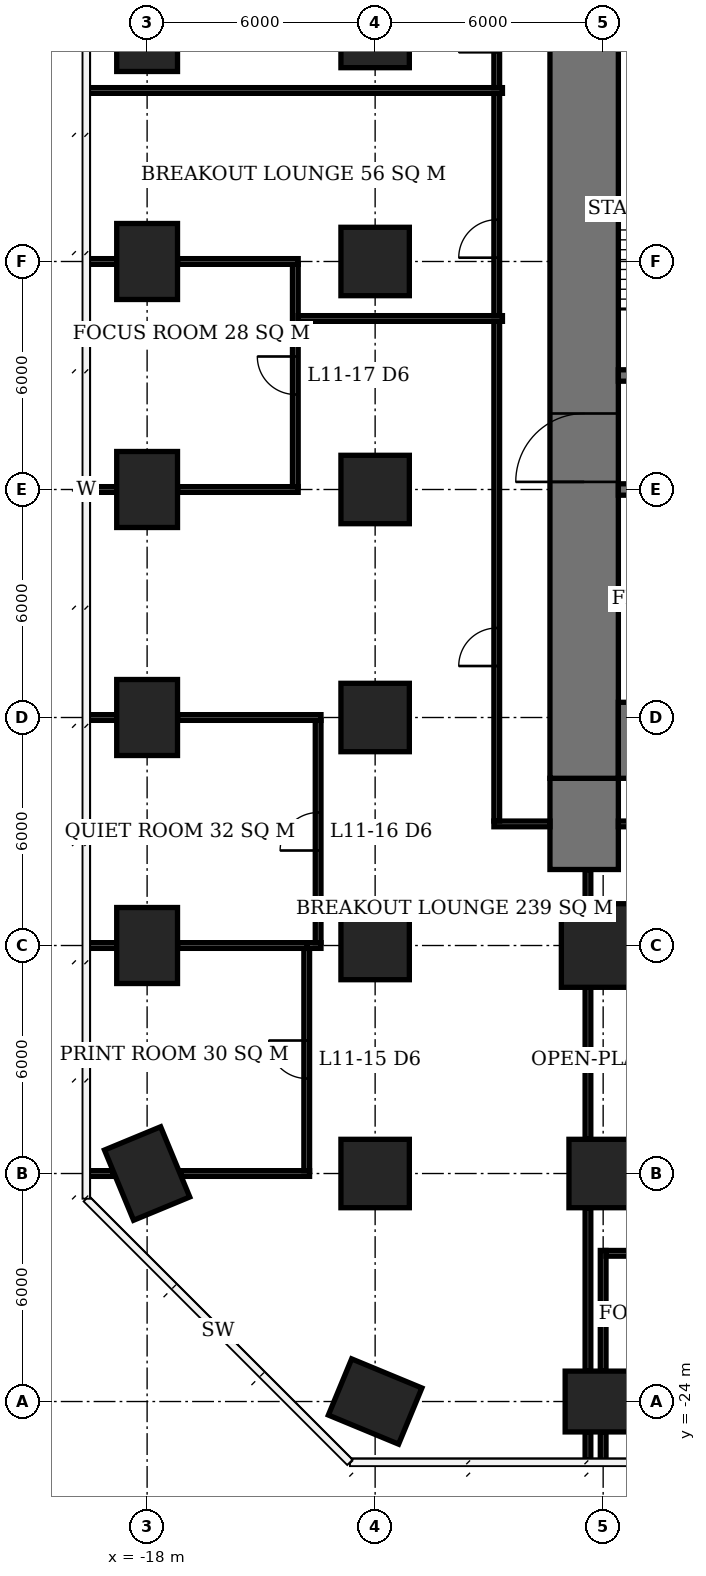
"""IFC4 building model, lengths in metres.
Left out: names, types, materials, properties, quantities, classifications, styles, units other than length and angle.
Written with IfcOpenShell. Run it as: python <this file> out.ifc"""

import sys

from ifc_helpers import new_model, si_unit, direction, frame, frame_2d, origin, origin_2d, place, context, subcontext, project, spatial, rectangle, extrude, element, fill, save


model = new_model("IFC4")
c1 = context("Model", 3, precision=1e-05, world=origin(), true_north=direction((0.0, 1.0)))
c2 = subcontext(c1, "Body", "Model", "MODEL_VIEW")
j1 = project(units=[si_unit("LENGTHUNIT", "METRE"), si_unit("PLANEANGLEUNIT", "RADIAN")], contexts=[c1])
p1 = place(None, origin())
s1 = spatial("IfcSite", under=j1, at=p1, CompositionType="ELEMENT")
p2 = place(p1, origin())
s2 = spatial("IfcBuilding", under=s1, at=p2, CompositionType="ELEMENT")
p3 = place(p2, frame((0.0, 0.0, 49.4)))
s3 = spatial("IfcBuildingStorey", under=s2, at=p3, CompositionType="ELEMENT", Elevation=49.4)
for number, where, z_axis, x_axis in (
    (1, (-18.0, -18.0, 0.0), (0.0, 0.0, 1.0), (-0.383, 0.924, 0.0)),
    (2, (-18.0, -12.0, 0.0), (0.0, 0.0, 1.0), (0.0, 1.0, 0.0)),
    (3, (-18.0, -6.0, 0.0), (0.0, 0.0, 1.0), (0.0, 1.0, 0.0)),
    (4, (-18.0, 0.0, 0.0), (0.0, 0.0, 1.0), (0.0, 1.0, 0.0)),
    (5, (-18.0, 6.0, 0.0), (0.0, 0.0, 1.0), (0.0, 1.0, 0.0)),
    (6, (-18.0, 12.0, 0.0), (0.0, 0.0, 1.0), (0.0, 1.0, 0.0)),
    (7, (-12.0, -24.0, 0.0), (0.0, 0.0, 1.0), (-0.924, 0.383, 0.0)),
):
    element("IfcColumn", number, at=place(p3, frame(where, z_axis=z_axis, x_axis=x_axis)), inside=s3, PredefinedType="COLUMN", context=c2, shape_type="SweptSolid", body=[
        extrude(rectangle(XDim=2.0, YDim=1.6, at=origin_2d()), origin(), (0.0, 0.0, 1.0), 3.9),
    ])
for number, where, z_axis, x_axis in (
    (8, (-12.0, -18.0, 0.0), (0.0, 0.0, 1.0), (1.0, 0.0, 0.0)),
    (9, (-12.0, -12.0, 0.0), (0.0, 0.0, 1.0), (1.0, 0.0, 0.0)),
    (10, (-12.0, -6.0, 0.0), (0.0, 0.0, 1.0), (1.0, 0.0, 0.0)),
    (11, (-12.0, 0.0, 0.0), (0.0, 0.0, 1.0), (1.0, 0.0, 0.0)),
    (12, (-12.0, 6.0, 0.0), (0.0, 0.0, 1.0), (1.0, 0.0, 0.0)),
    (13, (-12.0, 12.0, 0.0), (0.0, 0.0, 1.0), (1.0, 0.0, 0.0)),
):
    element("IfcColumn", number, at=place(p3, frame(where, z_axis=z_axis, x_axis=x_axis)), inside=s3, PredefinedType="COLUMN", context=c2, shape_type="SweptSolid", body=[
        extrude(rectangle(XDim=1.8, YDim=1.8, at=origin_2d()), origin(), (0.0, 0.0, 1.0), 3.9),
    ])
p4 = place(p3, frame((-6.0, -24.0, 0.0), z_axis=(0.0, 0.0, 1.0), x_axis=(1.0, 0.0, 0.0)))
e14 = element("IfcColumn", 14, at=p4, inside=s3, PredefinedType="COLUMN", context=c2, shape_type="SweptSolid", body=[
    extrude(rectangle(XDim=2.0, YDim=1.6, at=origin_2d()), origin(), (0.0, 0.0, 1.0), 3.9),
])
p5 = place(p3, frame((-6.0, -18.0, 0.0), z_axis=(0.0, 0.0, 1.0), x_axis=(1.0, 0.0, 0.0)))
e15 = element("IfcColumn", 15, at=p5, inside=s3, PredefinedType="COLUMN", context=c2, shape_type="SweptSolid", body=[
    extrude(rectangle(XDim=1.8, YDim=1.8, at=origin_2d()), origin(), (0.0, 0.0, 1.0), 3.9),
])
p6 = place(p3, frame((-6.0, -12.0, 0.0), z_axis=(0.0, 0.0, 1.0), x_axis=(1.0, 0.0, 0.0)))
e16 = element("IfcColumn", 16, at=p6, inside=s3, PredefinedType="COLUMN", context=c2, shape_type="SweptSolid", body=[
    extrude(rectangle(XDim=2.2, YDim=2.2, at=origin_2d()), origin(), (0.0, 0.0, 1.0), 3.9),
])
p7 = place(p3, frame((-5.6, -6.6, 0.0), z_axis=(0.0, 0.0, 1.0), x_axis=(1.0, 0.0, 0.0)))
e17 = element("IfcWall", 17, at=p7, inside=s3, PredefinedType="SHEAR", context=c2, shape_type="SweptSolid", body=[
    extrude(rectangle(XDim=23.2, YDim=2.0, at=frame_2d((11.6, 0.0))), origin(), (0.0, 0.0, 1.0), 3.9),
])
p8 = place(p3, frame((-6.5, -7.6, 0.0), z_axis=(0.0, 0.0, 1.0), x_axis=(0.0, 1.0, 0.0)))
e18 = element("IfcWall", 18, at=p8, inside=s3, PredefinedType="SHEAR", context=c2, shape_type="SweptSolid", body=[
    extrude(rectangle(XDim=21.2, YDim=1.8, at=frame_2d((10.6, 0.0))), origin(), (0.0, 0.0, 1.0), 3.9),
])
p9 = place(p8, frame((7.8, 0.0, 0.0)))
e19 = element("IfcOpeningElement", 19, at=p9, cuts=e18, PredefinedType="OPENING", context=c2, shape_type="SweptSolid", body=[
    extrude(rectangle(XDim=1.8, YDim=2.4, at=frame_2d((0.9, 1.2))), frame((0.0, 0.91, 0.0), z_axis=(0.0, -1.0, 0.0), x_axis=(1.0, 0.0, 0.0)), (0.0, 0.0, 1.0), 1.82),
])
p10 = place(p3, frame((-6.5, -10.0, 0.0), z_axis=(0.0, 0.0, 1.0), x_axis=(0.0, 1.0, 0.0)))
e20 = element("IfcWall", 20, at=p10, inside=s3, PredefinedType="SHEAR", context=c2, shape_type="SweptSolid", body=[
    extrude(rectangle(XDim=2.4, YDim=1.8, at=frame_2d((1.2, 0.0))), origin(), (0.0, 0.0, 1.0), 3.9),
])
p11 = place(p3, frame((-5.6, 0.0, 0.0), z_axis=(0.0, 0.0, 1.0), x_axis=(1.0, 0.0, 0.0)))
e21 = element("IfcWall", 21, at=p11, inside=s3, PredefinedType="SHEAR", context=c2, shape_type="SweptSolid", body=[
    extrude(rectangle(XDim=17.75, YDim=0.3, at=frame_2d((8.875, 0.0))), origin(), (0.0, 0.0, 1.0), 3.9),
])
p12 = place(p11, frame((0.6, 0.0, 0.0)))
e22 = element("IfcOpeningElement", 22, at=p12, cuts=e21, PredefinedType="OPENING", context=c2, shape_type="SweptSolid", body=[
    extrude(rectangle(XDim=0.9, YDim=2.1, at=frame_2d((0.45, 1.05))), frame((0.0, 0.16, 0.0), z_axis=(0.0, -1.0, 0.0), x_axis=(1.0, 0.0, 0.0)), (0.0, 0.0, 1.0), 0.32),
])
p13 = place(p3, frame((-5.6, 3.0, 0.0), z_axis=(0.0, 0.0, 1.0), x_axis=(1.0, 0.0, 0.0)))
e23 = element("IfcWall", 23, at=p13, inside=s3, PredefinedType="SHEAR", context=c2, shape_type="SweptSolid", body=[
    extrude(rectangle(XDim=5.45, YDim=0.3, at=frame_2d((2.725, 0.0))), origin(), (0.0, 0.0, 1.0), 3.9),
])
p14 = place(p13, frame((0.4, 0.0, 0.0)))
e24 = element("IfcOpeningElement", 24, at=p14, cuts=e23, PredefinedType="OPENING", context=c2, shape_type="SweptSolid", body=[
    extrude(rectangle(XDim=1.2, YDim=2.1, at=frame_2d((0.6, 1.05))), frame((0.0, 0.16, 0.0), z_axis=(0.0, -1.0, 0.0), x_axis=(1.0, 0.0, 0.0)), (0.0, 0.0, 1.0), 0.32),
])
p15 = place(p13, frame((3.95, 0.0, 0.0)))
e25 = element("IfcOpeningElement", 25, at=p15, cuts=e23, PredefinedType="OPENING", context=c2, shape_type="SweptSolid", body=[
    extrude(rectangle(XDim=0.9, YDim=2.1, at=frame_2d((0.45, 1.05))), frame((0.0, 0.16, 0.0), z_axis=(0.0, -1.0, 0.0), x_axis=(1.0, 0.0, 0.0)), (0.0, 0.0, 1.0), 0.32),
])
p16 = place(p3, frame((-5.925, -20.1, 0.0), z_axis=(0.0, 0.0, 1.0), x_axis=(1.0, 0.0, 0.0)))
e26 = element("IfcWall", 26, at=p16, inside=s3, PredefinedType="PARTITIONING", context=c2, shape_type="SweptSolid", body=[
    extrude(rectangle(XDim=5.85, YDim=0.15, at=frame_2d((2.925, 0.0))), origin(), (0.0, 0.0, 1.0), 3.65),
])
p17 = place(p16, frame((2.425, 0.0, 0.0)))
e27 = element("IfcOpeningElement", 27, at=p17, cuts=e26, PredefinedType="OPENING", context=c2, shape_type="SweptSolid", body=[
    extrude(rectangle(XDim=1.0, YDim=2.1, at=frame_2d((0.5, 1.05))), frame((0.0, 0.085, 0.0), z_axis=(0.0, -1.0, 0.0), x_axis=(1.0, 0.0, 0.0)), (0.0, 0.0, 1.0), 0.17),
])
p18 = place(p3, frame((-19.6, -18.0, 0.0), z_axis=(0.0, 0.0, 1.0), x_axis=(1.0, 0.0, 0.0)))
e28 = element("IfcWall", 28, at=p18, inside=s3, PredefinedType="PARTITIONING", context=c2, shape_type="SweptSolid", body=[
    extrude(rectangle(XDim=0.703, YDim=0.15, at=frame_2d((0.352, 0.0))), origin(), (0.0, 0.0, 1.0), 3.65),
])
p19 = place(p3, frame((-17.103, -18.0, 0.0), z_axis=(0.0, 0.0, 1.0), x_axis=(1.0, 0.0, 0.0)))
e29 = element("IfcWall", 29, at=p19, inside=s3, PredefinedType="PARTITIONING", context=c2, shape_type="SweptSolid", body=[
    extrude(rectangle(XDim=3.378, YDim=0.15, at=frame_2d((1.689, 0.0))), origin(), (0.0, 0.0, 1.0), 3.65),
])
p20 = place(p3, frame((-19.6, -12.0, 0.0), z_axis=(0.0, 0.0, 1.0), x_axis=(1.0, 0.0, 0.0)))
e30 = element("IfcWall", 30, at=p20, inside=s3, PredefinedType="PARTITIONING", context=c2, shape_type="SweptSolid", body=[
    extrude(rectangle(XDim=0.8, YDim=0.15, at=frame_2d((0.4, 0.0))), origin(), (0.0, 0.0, 1.0), 3.65),
])
p21 = place(p3, frame((-17.2, -12.0, 0.0), z_axis=(0.0, 0.0, 1.0), x_axis=(1.0, 0.0, 0.0)))
e31 = element("IfcWall", 31, at=p21, inside=s3, PredefinedType="PARTITIONING", context=c2, shape_type="SweptSolid", body=[
    extrude(rectangle(XDim=3.475, YDim=0.15, at=frame_2d((1.737, 0.0))), origin(), (0.0, 0.0, 1.0), 3.65),
])
p22 = place(p3, frame((-13.8, -12.0, 0.0), z_axis=(0.0, 0.0, 1.0), x_axis=(1.0, 0.0, 0.0)))
e32 = element("IfcWall", 32, at=p22, inside=s3, PredefinedType="PARTITIONING", context=c2, shape_type="SweptSolid", body=[
    extrude(rectangle(XDim=0.375, YDim=0.15, at=frame_2d((0.188, 0.0))), origin(), (0.0, 0.0, 1.0), 3.65),
])
p23 = place(p3, frame((-19.6, -6.0, 0.0), z_axis=(0.0, 0.0, 1.0), x_axis=(1.0, 0.0, 0.0)))
e33 = element("IfcWall", 33, at=p23, inside=s3, PredefinedType="PARTITIONING", context=c2, shape_type="SweptSolid", body=[
    extrude(rectangle(XDim=0.8, YDim=0.15, at=frame_2d((0.4, 0.0))), origin(), (0.0, 0.0, 1.0), 3.65),
])
p24 = place(p3, frame((-17.2, -6.0, 0.0), z_axis=(0.0, 0.0, 1.0), x_axis=(1.0, 0.0, 0.0)))
e34 = element("IfcWall", 34, at=p24, inside=s3, PredefinedType="PARTITIONING", context=c2, shape_type="SweptSolid", body=[
    extrude(rectangle(XDim=3.775, YDim=0.15, at=frame_2d((1.887, 0.0))), origin(), (0.0, 0.0, 1.0), 3.65),
])
p25 = place(p3, frame((-19.55, 0.0, 0.0), z_axis=(0.0, 0.0, 1.0), x_axis=(1.0, 0.0, 0.0)))
e35 = element("IfcWall", 35, at=p25, inside=s3, PredefinedType="PARTITIONING", context=c2, shape_type="SweptSolid", body=[
    extrude(rectangle(XDim=0.75, YDim=0.15, at=frame_2d((0.375, 0.0))), origin(), (0.0, 0.0, 1.0), 3.65),
])
p26 = place(p3, frame((-17.2, 0.0, 0.0), z_axis=(0.0, 0.0, 1.0), x_axis=(1.0, 0.0, 0.0)))
e36 = element("IfcWall", 36, at=p26, inside=s3, PredefinedType="PARTITIONING", context=c2, shape_type="SweptSolid", body=[
    extrude(rectangle(XDim=3.175, YDim=0.15, at=frame_2d((1.587, 0.0))), origin(), (0.0, 0.0, 1.0), 3.65),
])
p27 = place(p3, frame((-19.6, 6.0, 0.0), z_axis=(0.0, 0.0, 1.0), x_axis=(1.0, 0.0, 0.0)))
e37 = element("IfcWall", 37, at=p27, inside=s3, PredefinedType="PARTITIONING", context=c2, shape_type="SweptSolid", body=[
    extrude(rectangle(XDim=0.8, YDim=0.15, at=frame_2d((0.4, 0.0))), origin(), (0.0, 0.0, 1.0), 3.65),
])
p28 = place(p3, frame((-17.2, 6.0, 0.0), z_axis=(0.0, 0.0, 1.0), x_axis=(1.0, 0.0, 0.0)))
e38 = element("IfcWall", 38, at=p28, inside=s3, PredefinedType="PARTITIONING", context=c2, shape_type="SweptSolid", body=[
    extrude(rectangle(XDim=3.175, YDim=0.15, at=frame_2d((1.587, 0.0))), origin(), (0.0, 0.0, 1.0), 3.65),
])
p29 = place(p3, frame((-14.1, 0.075, 0.0), z_axis=(0.0, 0.0, 1.0), x_axis=(0.0, 1.0, 0.0)))
e39 = element("IfcWall", 39, at=p29, inside=s3, PredefinedType="PARTITIONING", context=c2, shape_type="SweptSolid", body=[
    extrude(rectangle(XDim=5.85, YDim=0.15, at=frame_2d((2.925, 0.0))), origin(), (0.0, 0.0, 1.0), 3.65),
])
p30 = place(p29, frame((2.425, 0.0, 0.0)))
e40 = element("IfcOpeningElement", 40, at=p30, cuts=e39, PredefinedType="OPENING", context=c2, shape_type="SweptSolid", body=[
    extrude(rectangle(XDim=1.0, YDim=2.1, at=frame_2d((0.5, 1.05))), frame((0.0, 0.085, 0.0), z_axis=(0.0, -1.0, 0.0), x_axis=(1.0, 0.0, 0.0)), (0.0, 0.0, 1.0), 0.17),
])
p31 = place(p3, frame((-13.8, -17.925, 0.0), z_axis=(0.0, 0.0, 1.0), x_axis=(0.0, 1.0, 0.0)))
e41 = element("IfcWall", 41, at=p31, inside=s3, PredefinedType="PARTITIONING", context=c2, shape_type="SweptSolid", body=[
    extrude(rectangle(XDim=5.85, YDim=0.15, at=frame_2d((2.925, 0.0))), origin(), (0.0, 0.0, 1.0), 3.65),
])
p32 = place(p31, frame((2.425, 0.0, 0.0)))
e42 = element("IfcOpeningElement", 42, at=p32, cuts=e41, PredefinedType="OPENING", context=c2, shape_type="SweptSolid", body=[
    extrude(rectangle(XDim=1.0, YDim=2.1, at=frame_2d((0.5, 1.05))), frame((0.0, 0.085, 0.0), z_axis=(0.0, -1.0, 0.0), x_axis=(1.0, 0.0, 0.0)), (0.0, 0.0, 1.0), 0.17),
])
p33 = place(p3, frame((-13.5, -11.925, 0.0), z_axis=(0.0, 0.0, 1.0), x_axis=(0.0, 1.0, 0.0)))
e43 = element("IfcWall", 43, at=p33, inside=s3, PredefinedType="PARTITIONING", context=c2, shape_type="SweptSolid", body=[
    extrude(rectangle(XDim=5.85, YDim=0.15, at=frame_2d((2.925, 0.0))), origin(), (0.0, 0.0, 1.0), 3.65),
])
p34 = place(p33, frame((2.425, 0.0, 0.0)))
e44 = element("IfcOpeningElement", 44, at=p34, cuts=e43, PredefinedType="OPENING", context=c2, shape_type="SweptSolid", body=[
    extrude(rectangle(XDim=1.0, YDim=2.1, at=frame_2d((0.5, 1.05))), frame((0.0, 0.085, 0.0), z_axis=(0.0, -1.0, 0.0), x_axis=(1.0, 0.0, 0.0)), (0.0, 0.0, 1.0), 0.17),
])
p35 = place(p3, frame((-6.0, -25.6, 0.0), z_axis=(0.0, 0.0, 1.0), x_axis=(0.0, 1.0, 0.0)))
e45 = element("IfcWall", 45, at=p35, inside=s3, PredefinedType="PARTITIONING", context=c2, shape_type="SweptSolid", body=[
    extrude(rectangle(XDim=0.8, YDim=0.15, at=frame_2d((0.4, 0.0))), origin(), (0.0, 0.0, 1.0), 3.65),
])
p36 = place(p3, frame((-6.0, -23.2, 0.0), z_axis=(0.0, 0.0, 1.0), x_axis=(0.0, 1.0, 0.0)))
e46 = element("IfcWall", 46, at=p36, inside=s3, PredefinedType="PARTITIONING", context=c2, shape_type="SweptSolid", body=[
    extrude(rectangle(XDim=3.175, YDim=0.15, at=frame_2d((1.587, 0.0))), origin(), (0.0, 0.0, 1.0), 3.65),
])
p37 = place(p3, frame((-19.6, 10.5, 0.0), z_axis=(0.0, 0.0, 1.0), x_axis=(1.0, 0.0, 0.0)))
e47 = element("IfcWall", 47, at=p37, inside=s3, PredefinedType="PARTITIONING", context=c2, shape_type="SweptSolid", body=[
    extrude(rectangle(XDim=10.95, YDim=0.15, at=frame_2d((5.475, 0.0))), origin(), (0.0, 0.0, 1.0), 3.65),
])
p38 = place(p3, frame((-14.025, 4.5, 0.0), z_axis=(0.0, 0.0, 1.0), x_axis=(1.0, 0.0, 0.0)))
e48 = element("IfcWall", 48, at=p38, inside=s3, PredefinedType="PARTITIONING", context=c2, shape_type="SweptSolid", body=[
    extrude(rectangle(XDim=5.375, YDim=0.15, at=frame_2d((2.688, 0.0))), origin(), (0.0, 0.0, 1.0), 3.65),
])
p39 = place(p3, frame((-8.8, -8.725, 0.0), z_axis=(0.0, 0.0, 1.0), x_axis=(0.0, 1.0, 0.0)))
e49 = element("IfcWall", 49, at=p39, inside=s3, PredefinedType="PARTITIONING", context=c2, shape_type="SweptSolid", body=[
    extrude(rectangle(XDim=13.15, YDim=0.15, at=frame_2d((6.575, 0.0))), origin(), (0.0, 0.0, 1.0), 3.65),
])
p40 = place(p39, frame((4.08, 0.0, 0.0)))
e50 = element("IfcOpeningElement", 50, at=p40, cuts=e49, PredefinedType="OPENING", context=c2, shape_type="SweptSolid", body=[
    extrude(rectangle(XDim=1.0, YDim=2.1, at=frame_2d((0.5, 1.05))), frame((0.0, 0.085, 0.0), z_axis=(0.0, -1.0, 0.0), x_axis=(1.0, 0.0, 0.0)), (0.0, 0.0, 1.0), 0.17),
])
p41 = place(p3, frame((-8.875, -8.8, 0.0), z_axis=(0.0, 0.0, 1.0), x_axis=(1.0, 0.0, 0.0)))
e51 = element("IfcWall", 51, at=p41, inside=s3, PredefinedType="PARTITIONING", context=c2, shape_type="SweptSolid", body=[
    extrude(rectangle(XDim=1.475, YDim=0.15, at=frame_2d((0.738, 0.0))), origin(), (0.0, 0.0, 1.0), 3.65),
])
p42 = place(p3, frame((-8.8, 4.575, 0.0), z_axis=(0.0, 0.0, 1.0), x_axis=(0.0, 1.0, 0.0)))
e52 = element("IfcWall", 52, at=p42, inside=s3, PredefinedType="PARTITIONING", context=c2, shape_type="SweptSolid", body=[
    extrude(rectangle(XDim=5.85, YDim=0.15, at=frame_2d((2.925, 0.0))), origin(), (0.0, 0.0, 1.0), 3.65),
])
p43 = place(p42, frame((1.525, 0.0, 0.0)))
e53 = element("IfcOpeningElement", 53, at=p43, cuts=e52, PredefinedType="OPENING", context=c2, shape_type="SweptSolid", body=[
    extrude(rectangle(XDim=1.0, YDim=2.1, at=frame_2d((0.5, 1.05))), frame((0.0, 0.085, 0.0), z_axis=(0.0, -1.0, 0.0), x_axis=(1.0, 0.0, 0.0)), (0.0, 0.0, 1.0), 0.17),
])
p44 = place(p3, frame((-8.8, 10.575, 0.0), z_axis=(0.0, 0.0, 1.0), x_axis=(0.0, 1.0, 0.0)))
e54 = element("IfcWall", 54, at=p44, inside=s3, PredefinedType="PARTITIONING", context=c2, shape_type="SweptSolid", body=[
    extrude(rectangle(XDim=4.15, YDim=0.15, at=frame_2d((2.075, 0.0))), origin(), (0.0, 0.0, 1.0), 3.65),
])
p45 = place(p44, frame((0.93, 0.0, 0.0)))
e55 = element("IfcOpeningElement", 55, at=p45, cuts=e54, PredefinedType="OPENING", context=c2, shape_type="SweptSolid", body=[
    extrude(rectangle(XDim=1.0, YDim=2.1, at=frame_2d((0.5, 1.05))), frame((0.0, 0.085, 0.0), z_axis=(0.0, -1.0, 0.0), x_axis=(1.0, 0.0, 0.0)), (0.0, 0.0, 1.0), 0.17),
])
p46 = place(p3, frame((-6.4, -25.55, 0.0), z_axis=(0.0, 0.0, 1.0), x_axis=(0.0, 1.0, 0.0)))
e56 = element("IfcWall", 56, at=p46, inside=s3, PredefinedType="PARTITIONING", context=c2, shape_type="SweptSolid", body=[
    extrude(rectangle(XDim=0.75, YDim=0.15, at=frame_2d((0.375, 0.0))), origin(), (0.0, 0.0, 1.0), 3.65),
])
p47 = place(p3, frame((-6.4, -23.2, 0.0), z_axis=(0.0, 0.0, 1.0), x_axis=(0.0, 1.0, 0.0)))
e57 = element("IfcWall", 57, at=p47, inside=s3, PredefinedType="PARTITIONING", context=c2, shape_type="SweptSolid", body=[
    extrude(rectangle(XDim=4.3, YDim=0.15, at=frame_2d((2.15, 0.0))), origin(), (0.0, 0.0, 1.0), 3.65),
])
p48 = place(p3, frame((-6.4, -17.1, 0.0), z_axis=(0.0, 0.0, 1.0), x_axis=(0.0, 1.0, 0.0)))
e58 = element("IfcWall", 58, at=p48, inside=s3, PredefinedType="PARTITIONING", context=c2, shape_type="SweptSolid", body=[
    extrude(rectangle(XDim=4.0, YDim=0.15, at=frame_2d((2.0, 0.0))), origin(), (0.0, 0.0, 1.0), 3.65),
])
p49 = place(p3, frame((-6.4, -10.9, 0.0), z_axis=(0.0, 0.0, 1.0), x_axis=(0.0, 1.0, 0.0)))
e59 = element("IfcWall", 59, at=p49, inside=s3, PredefinedType="PARTITIONING", context=c2, shape_type="SweptSolid", body=[
    extrude(rectangle(XDim=0.9, YDim=0.15, at=frame_2d((0.45, 0.0))), origin(), (0.0, 0.0, 1.0), 3.65),
])
p50 = place(p3, frame((-5.6, -8.8, 0.0), z_axis=(0.0, 0.0, 1.0), x_axis=(1.0, 0.0, 0.0)))
e60 = element("IfcWall", 60, at=p50, inside=s3, PredefinedType="PARTITIONING", context=c2, shape_type="SweptSolid", body=[
    extrude(rectangle(XDim=4.025, YDim=0.15, at=frame_2d((2.013, 0.0))), origin(), (0.0, 0.0, 1.0), 3.65),
])
p51 = place(p50, frame((0.935, 0.0, 0.0)))
e61 = element("IfcOpeningElement", 61, at=p51, cuts=e60, PredefinedType="OPENING", context=c2, shape_type="SweptSolid", body=[
    extrude(rectangle(XDim=1.0, YDim=2.1, at=frame_2d((0.5, 1.05))), frame((0.0, 0.085, 0.0), z_axis=(0.0, -1.0, 0.0), x_axis=(1.0, 0.0, 0.0)), (0.0, 0.0, 1.0), 0.17),
])
p52 = place(p9, origin())
e62 = element("IfcDoor", 62, at=p52, inside=s3, OperationType="DOUBLE_DOOR_SINGLE_SWING", PredefinedType="DOOR", context=c2, shape_type="SweptSolid", body=[
    extrude(rectangle(XDim=1.8, YDim=2.4, at=frame_2d((0.9, 1.2))), frame((0.0, 0.025, 0.0), z_axis=(0.0, -1.0, 0.0), x_axis=(1.0, 0.0, 0.0)), (0.0, 0.0, 1.0), 0.05),
])
fill(e19, e62)
p53 = place(p32, origin())
e63 = element("IfcDoor", 63, at=p53, inside=s3, OperationType="SINGLE_SWING_RIGHT", PredefinedType="DOOR", context=c2, shape_type="SweptSolid", body=[
    extrude(rectangle(XDim=1.0, YDim=2.1, at=frame_2d((0.5, 1.05))), frame((0.0, 0.025, 0.0), z_axis=(0.0, -1.0, 0.0), x_axis=(1.0, 0.0, 0.0)), (0.0, 0.0, 1.0), 0.05),
])
fill(e42, e63)
p54 = place(p34, origin())
e64 = element("IfcDoor", 64, at=p54, inside=s3, OperationType="SINGLE_SWING_LEFT", PredefinedType="DOOR", context=c2, shape_type="SweptSolid", body=[
    extrude(rectangle(XDim=1.0, YDim=2.1, at=frame_2d((0.5, 1.05))), frame((0.0, 0.025, 0.0), z_axis=(0.0, -1.0, 0.0), x_axis=(1.0, 0.0, 0.0)), (0.0, 0.0, 1.0), 0.05),
])
fill(e44, e64)
p55 = place(p30, origin())
e65 = element("IfcDoor", 65, at=p55, inside=s3, OperationType="SINGLE_SWING_RIGHT", PredefinedType="DOOR", context=c2, shape_type="SweptSolid", body=[
    extrude(rectangle(XDim=1.0, YDim=2.1, at=frame_2d((0.5, 1.05))), frame((0.0, 0.025, 0.0), z_axis=(0.0, -1.0, 0.0), x_axis=(1.0, 0.0, 0.0)), (0.0, 0.0, 1.0), 0.05),
])
fill(e40, e65)
p56 = place(p40, origin())
e66 = element("IfcDoor", 66, at=p56, inside=s3, OperationType="SINGLE_SWING_LEFT", PredefinedType="DOOR", context=c2, shape_type="SweptSolid", body=[
    extrude(rectangle(XDim=1.0, YDim=2.1, at=frame_2d((0.5, 1.05))), frame((0.0, 0.025, 0.0), z_axis=(0.0, -1.0, 0.0), x_axis=(1.0, 0.0, 0.0)), (0.0, 0.0, 1.0), 0.05),
])
fill(e50, e66)
p57 = place(p43, origin())
e67 = element("IfcDoor", 67, at=p57, inside=s3, OperationType="SINGLE_SWING_LEFT", PredefinedType="DOOR", context=c2, shape_type="SweptSolid", body=[
    extrude(rectangle(XDim=1.0, YDim=2.1, at=frame_2d((0.5, 1.05))), frame((0.0, 0.025, 0.0), z_axis=(0.0, -1.0, 0.0), x_axis=(1.0, 0.0, 0.0)), (0.0, 0.0, 1.0), 0.05),
])
fill(e53, e67)
save(model, sys.argv[1])
